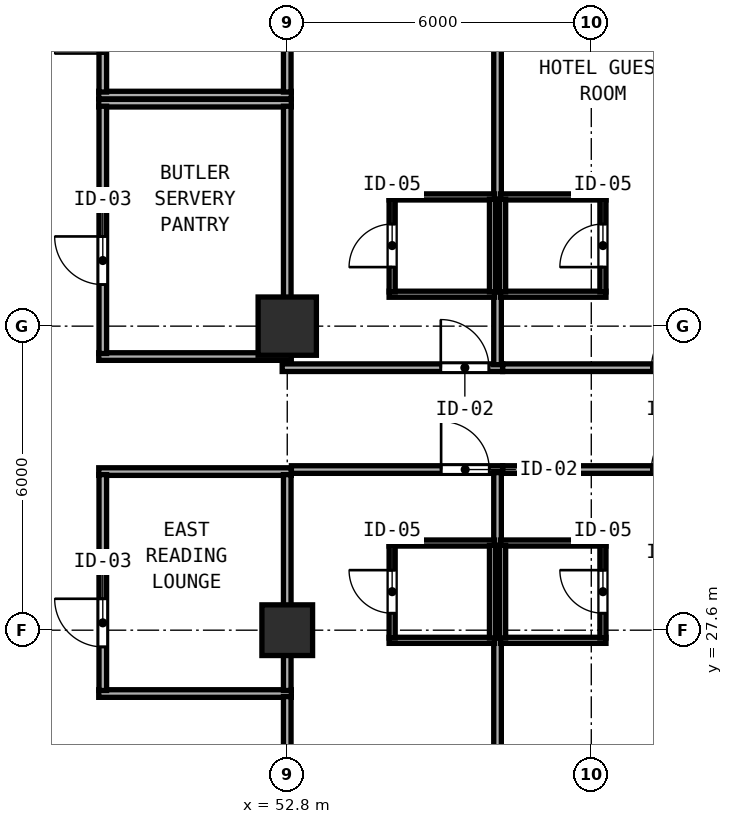
"""IFC4 building model, lengths in metres.
Left out: names, types, materials, properties, quantities, classifications, styles, units other than length and angle.
Written with IfcOpenShell. Run it as: python <this file> out.ifc"""

import sys

from ifc_helpers import new_model, si_unit, direction, frame, frame_2d, origin, origin_2d, place, context, subcontext, project, spatial, rectangle, hollow_rectangle, extrude, element, fill, save


model = new_model("IFC4")
c1 = context("Model", 3, precision=1e-05, world=origin(), true_north=direction((0.0, 1.0)))
c2 = subcontext(c1, "Body", "Model", "MODEL_VIEW")
j1 = project(units=[si_unit("LENGTHUNIT", "METRE"), si_unit("PLANEANGLEUNIT", "RADIAN")], contexts=[c1])
p1 = place(None, origin())
s1 = spatial("IfcSite", under=j1, at=p1, CompositionType="ELEMENT")
p2 = place(p1, origin())
s2 = spatial("IfcBuilding", under=s1, at=p2, CompositionType="ELEMENT")
p3 = place(p2, frame((0.0, 0.0, 78.0)))
s3 = spatial("IfcBuildingStorey", under=s2, at=p3, CompositionType="ELEMENT", Elevation=78.0)
p4 = place(p3, frame((52.8, 33.6, 0.0), z_axis=(0.0, 0.0, 1.0), x_axis=(1.0, 0.0, 0.0)))
e1 = element("IfcColumn", 1, at=p4, inside=s3, PredefinedType="COLUMN", context=c2, shape_type="SweptSolid", body=[
    extrude(hollow_rectangle(XDim=1.15, YDim=1.15, WallThickness=0.042, at=origin_2d()), origin(), (0.0, 0.0, 1.0), 3.8),
])
p5 = place(p3, frame((52.8, 27.6, 0.0), z_axis=(0.0, 0.0, 1.0), x_axis=(1.0, 0.0, 0.0)))
e2 = element("IfcColumn", 2, at=p5, inside=s3, PredefinedType="COLUMN", context=c2, shape_type="SweptSolid", body=[
    extrude(hollow_rectangle(XDim=1.0, YDim=1.0, WallThickness=0.038, at=origin_2d()), origin(), (0.0, 0.0, 1.0), 3.8),
])
for number, where, z_axis, x_axis in (
    (3, (49.08, 38.0, 0.0), (0.0, 0.0, 1.0), (1.0, 0.0, 0.0)),
    (4, (49.08, 33.0, 0.0), (0.0, 0.0, 1.0), (1.0, 0.0, 0.0)),
):
    element("IfcWall", number, at=place(p3, frame(where, z_axis=z_axis, x_axis=x_axis)), inside=s3, PredefinedType="PARTITIONING", context=c2, shape_type="SweptSolid", body=[
        extrude(rectangle(XDim=3.8, YDim=0.15, at=frame_2d((1.9, 0.0))), origin(), (0.0, 0.0, 1.0), 3.6),
    ])
p6 = place(p3, frame((49.16, 33.06, 0.0), z_axis=(0.0, 0.0, 1.0), x_axis=(0.0, 1.0, 0.0)))
e5 = element("IfcWall", 5, at=p6, inside=s3, PredefinedType="PARTITIONING", context=c2, shape_type="SweptSolid", body=[
    extrude(rectangle(XDim=4.88, YDim=0.15, at=frame_2d((2.44, 0.0))), origin(), (0.0, 0.0, 1.0), 3.6),
])
p7 = place(p6, frame((1.36, 0.0, 0.0)))
e6 = element("IfcOpeningElement", 6, at=p7, cuts=e5, PredefinedType="OPENING", context=c2, shape_type="SweptSolid", body=[
    extrude(rectangle(XDim=0.95, YDim=2.12, at=frame_2d((0.475, 1.06))), frame((0.0, 0.085, 0.0), z_axis=(0.0, -1.0, 0.0), x_axis=(1.0, 0.0, 0.0)), (0.0, 0.0, 1.0), 0.17),
])
p8 = place(p3, frame((52.8, 33.06, 0.0), z_axis=(0.0, 0.0, 1.0), x_axis=(0.0, 1.0, 0.0)))
e7 = element("IfcWall", 7, at=p8, inside=s3, PredefinedType="PARTITIONING", context=c2, shape_type="SweptSolid", body=[
    extrude(rectangle(XDim=4.88, YDim=0.15, at=frame_2d((2.44, 0.0))), origin(), (0.0, 0.0, 1.0), 3.097),
])
p9 = place(p3, frame((49.08, 38.16, 0.0), z_axis=(0.0, 0.0, 1.0), x_axis=(1.0, 0.0, 0.0)))
e8 = element("IfcWall", 8, at=p9, inside=s3, PredefinedType="PARTITIONING", context=c2, shape_type="SweptSolid", body=[
    extrude(rectangle(XDim=3.8, YDim=0.15, at=frame_2d((1.9, 0.0))), origin(), (0.0, 0.0, 1.0), 3.6),
])
p10 = place(p3, frame((49.16, 38.22, 0.0), z_axis=(0.0, 0.0, 1.0), x_axis=(0.0, 1.0, 0.0)))
e9 = element("IfcWall", 9, at=p10, inside=s3, PredefinedType="PARTITIONING", context=c2, shape_type="SweptSolid", body=[
    extrude(rectangle(XDim=3.12, YDim=0.15, at=frame_2d((1.56, 0.0))), origin(), (0.0, 0.0, 1.0), 3.6),
])
p11 = place(p10, frame((0.76, 0.0, 0.0)))
e10 = element("IfcOpeningElement", 10, at=p11, cuts=e9, PredefinedType="OPENING", context=c2, shape_type="SweptSolid", body=[
    extrude(rectangle(XDim=0.95, YDim=2.12, at=frame_2d((0.475, 1.06))), frame((0.0, 0.085, 0.0), z_axis=(0.0, -1.0, 0.0), x_axis=(1.0, 0.0, 0.0)), (0.0, 0.0, 1.0), 0.17),
])
p12 = place(p3, frame((52.8, 38.22, 0.0), z_axis=(0.0, 0.0, 1.0), x_axis=(0.0, 1.0, 0.0)))
e11 = element("IfcWall", 11, at=p12, inside=s3, PredefinedType="PARTITIONING", context=c2, shape_type="SweptSolid", body=[
    extrude(rectangle(XDim=3.12, YDim=0.15, at=frame_2d((1.56, 0.0))), origin(), (0.0, 0.0, 1.0), 3.097),
])
for number, where, z_axis, x_axis in (
    (12, (49.08, 30.73, 0.0), (0.0, 0.0, 1.0), (1.0, 0.0, 0.0)),
    (13, (49.08, 26.35, 0.0), (0.0, 0.0, 1.0), (1.0, 0.0, 0.0)),
):
    element("IfcWall", number, at=place(p3, frame(where, z_axis=z_axis, x_axis=x_axis)), inside=s3, PredefinedType="PARTITIONING", context=c2, shape_type="SweptSolid", body=[
        extrude(rectangle(XDim=3.8, YDim=0.15, at=frame_2d((1.9, 0.0))), origin(), (0.0, 0.0, 1.0), 3.6),
    ])
p13 = place(p3, frame((49.16, 26.41, 0.0), z_axis=(0.0, 0.0, 1.0), x_axis=(0.0, 1.0, 0.0)))
e14 = element("IfcWall", 14, at=p13, inside=s3, PredefinedType="PARTITIONING", context=c2, shape_type="SweptSolid", body=[
    extrude(rectangle(XDim=4.26, YDim=0.15, at=frame_2d((2.13, 0.0))), origin(), (0.0, 0.0, 1.0), 3.6),
])
p14 = place(p13, frame((0.86, 0.0, 0.0)))
e15 = element("IfcOpeningElement", 15, at=p14, cuts=e14, PredefinedType="OPENING", context=c2, shape_type="SweptSolid", body=[
    extrude(rectangle(XDim=0.95, YDim=2.12, at=frame_2d((0.475, 1.06))), frame((0.0, 0.085, 0.0), z_axis=(0.0, -1.0, 0.0), x_axis=(1.0, 0.0, 0.0)), (0.0, 0.0, 1.0), 0.17),
])
p15 = place(p3, frame((52.8, 26.41, 0.0), z_axis=(0.0, 0.0, 1.0), x_axis=(0.0, 1.0, 0.0)))
e16 = element("IfcWall", 16, at=p15, inside=s3, PredefinedType="PARTITIONING", context=c2, shape_type="SweptSolid", body=[
    extrude(rectangle(XDim=4.26, YDim=0.15, at=frame_2d((2.13, 0.0))), origin(), (0.0, 0.0, 1.0), 3.097),
])
p16 = place(p3, frame((52.7, 32.78, 0.0), z_axis=(0.0, 0.0, 1.0), x_axis=(1.0, 0.0, 0.0)))
e17 = element("IfcWall", 17, at=p16, inside=s3, PredefinedType="PARTITIONING", context=c2, shape_type="SweptSolid", body=[
    extrude(rectangle(XDim=4.35, YDim=0.15, at=frame_2d((2.175, 0.0))), origin(), (0.0, 0.0, 1.0), 3.6),
])
p17 = place(p16, frame((3.13, 0.0, 0.0)))
e18 = element("IfcOpeningElement", 18, at=p17, cuts=e17, PredefinedType="OPENING", context=c2, shape_type="SweptSolid", body=[
    extrude(rectangle(XDim=0.95, YDim=2.15, at=frame_2d((0.475, 1.075))), frame((0.0, 0.085, 0.0), z_axis=(0.0, -1.0, 0.0), x_axis=(1.0, 0.0, 0.0)), (0.0, 0.0, 1.0), 0.17),
])
p18 = place(p3, frame((56.95, 32.84, 0.0), z_axis=(0.0, 0.0, 1.0), x_axis=(0.0, 1.0, 0.0)))
e19 = element("IfcWall", 19, at=p18, inside=s3, PredefinedType="PARTITIONING", context=c2, shape_type="SweptSolid", body=[
    extrude(rectangle(XDim=9.939, YDim=0.15, at=frame_2d((4.97, 0.0))), origin(), (0.0, 0.0, 1.0), 3.6),
])
for number, where, z_axis, x_axis in (
    (20, (54.81, 36.15, 0.0), (0.0, 0.0, 1.0), (1.0, 0.0, 0.0)),
    (21, (54.81, 34.23, 0.0), (0.0, 0.0, 1.0), (1.0, 0.0, 0.0)),
):
    element("IfcWall", number, at=place(p3, frame(where, z_axis=z_axis, x_axis=x_axis)), inside=s3, PredefinedType="PARTITIONING", context=c2, shape_type="SweptSolid", body=[
        extrude(rectangle(XDim=2.08, YDim=0.12, at=frame_2d((1.04, 0.0))), origin(), (0.0, 0.0, 1.0), 3.6),
    ])
p19 = place(p3, frame((54.87, 34.275, 0.0), z_axis=(0.0, 0.0, 1.0), x_axis=(0.0, 1.0, 0.0)))
e22 = element("IfcWall", 22, at=p19, inside=s3, PredefinedType="PARTITIONING", context=c2, shape_type="SweptSolid", body=[
    extrude(rectangle(XDim=1.83, YDim=0.12, at=frame_2d((0.915, 0.0))), origin(), (0.0, 0.0, 1.0), 3.6),
])
p20 = place(p19, frame((1.34, 0.0, 0.0), z_axis=(0.0, 0.0, 1.0), x_axis=(-1.0, 0.0, 0.0)))
e23 = element("IfcOpeningElement", 23, at=p20, cuts=e22, PredefinedType="OPENING", context=c2, shape_type="SweptSolid", body=[
    extrude(rectangle(XDim=0.85, YDim=2.1, at=frame_2d((0.425, 1.05))), frame((0.0, 0.07, 0.0), z_axis=(0.0, -1.0, 0.0), x_axis=(1.0, 0.0, 0.0)), (0.0, 0.0, 1.0), 0.14),
])
p21 = place(p3, frame((56.85, 34.275, 0.0), z_axis=(0.0, 0.0, 1.0), x_axis=(0.0, 1.0, 0.0)))
e24 = element("IfcWall", 24, at=p21, inside=s3, PredefinedType="PARTITIONING", context=c2, shape_type="SweptSolid", body=[
    extrude(rectangle(XDim=1.83, YDim=0.12, at=frame_2d((0.915, 0.0))), origin(), (0.0, 0.0, 1.0), 3.6),
])
p22 = place(p3, frame((57.052, 32.78, 0.0), z_axis=(0.0, 0.0, 1.0), x_axis=(1.0, 0.0, 0.0)))
e25 = element("IfcWall", 25, at=p22, inside=s3, PredefinedType="PARTITIONING", context=c2, shape_type="SweptSolid", body=[
    extrude(rectangle(XDim=4.148, YDim=0.15, at=frame_2d((2.074, 0.0))), origin(), (0.0, 0.0, 1.0), 3.6),
])
p23 = place(p22, frame((2.935, 0.0, 0.0)))
e26 = element("IfcOpeningElement", 26, at=p23, cuts=e25, PredefinedType="OPENING", context=c2, shape_type="SweptSolid", body=[
    extrude(rectangle(XDim=0.95, YDim=2.15, at=frame_2d((0.475, 1.075))), frame((0.0, 0.085, 0.0), z_axis=(0.0, -1.0, 0.0), x_axis=(1.0, 0.0, 0.0)), (0.0, 0.0, 1.0), 0.17),
])
for number, where, z_axis, x_axis in (
    (27, (57.01, 36.15, 0.0), (0.0, 0.0, 1.0), (1.0, 0.0, 0.0)),
    (28, (57.01, 34.23, 0.0), (0.0, 0.0, 1.0), (1.0, 0.0, 0.0)),
):
    element("IfcWall", number, at=place(p3, frame(where, z_axis=z_axis, x_axis=x_axis)), inside=s3, PredefinedType="PARTITIONING", context=c2, shape_type="SweptSolid", body=[
        extrude(rectangle(XDim=2.08, YDim=0.12, at=frame_2d((1.04, 0.0))), origin(), (0.0, 0.0, 1.0), 3.6),
    ])
p24 = place(p3, frame((57.05, 34.275, 0.0), z_axis=(0.0, 0.0, 1.0), x_axis=(0.0, 1.0, 0.0)))
e29 = element("IfcWall", 29, at=p24, inside=s3, PredefinedType="PARTITIONING", context=c2, shape_type="SweptSolid", body=[
    extrude(rectangle(XDim=1.83, YDim=0.12, at=frame_2d((0.915, 0.0))), origin(), (0.0, 0.0, 1.0), 3.6),
])
p25 = place(p3, frame((59.03, 34.275, 0.0), z_axis=(0.0, 0.0, 1.0), x_axis=(0.0, 1.0, 0.0)))
e30 = element("IfcWall", 30, at=p25, inside=s3, PredefinedType="PARTITIONING", context=c2, shape_type="SweptSolid", body=[
    extrude(rectangle(XDim=1.83, YDim=0.12, at=frame_2d((0.915, 0.0))), origin(), (0.0, 0.0, 1.0), 3.6),
])
p26 = place(p25, frame((0.49, 0.0, 0.0)))
e31 = element("IfcOpeningElement", 31, at=p26, cuts=e30, PredefinedType="OPENING", context=c2, shape_type="SweptSolid", body=[
    extrude(rectangle(XDim=0.85, YDim=2.1, at=frame_2d((0.425, 1.05))), frame((0.0, 0.07, 0.0), z_axis=(0.0, -1.0, 0.0), x_axis=(1.0, 0.0, 0.0)), (0.0, 0.0, 1.0), 0.14),
])
p27 = place(p3, frame((52.882, 30.77, 0.0), z_axis=(0.0, 0.0, 1.0), x_axis=(1.0, 0.0, 0.0)))
e32 = element("IfcWall", 32, at=p27, inside=s3, PredefinedType="PARTITIONING", context=c2, shape_type="SweptSolid", body=[
    extrude(rectangle(XDim=4.168, YDim=0.15, at=frame_2d((2.084, 0.0))), origin(), (0.0, 0.0, 1.0), 3.6),
])
p28 = place(p27, frame((3.905, 0.0, 0.0), z_axis=(0.0, 0.0, 1.0), x_axis=(-1.0, 0.0, 0.0)))
e33 = element("IfcOpeningElement", 33, at=p28, cuts=e32, PredefinedType="OPENING", context=c2, shape_type="SweptSolid", body=[
    extrude(rectangle(XDim=0.95, YDim=2.15, at=frame_2d((0.475, 1.075))), frame((0.0, 0.085, 0.0), z_axis=(0.0, -1.0, 0.0), x_axis=(1.0, 0.0, 0.0)), (0.0, 0.0, 1.0), 0.17),
])
p29 = place(p3, frame((52.8, 21.819, 0.0), z_axis=(0.0, 0.0, 1.0), x_axis=(0.0, 1.0, 0.0)))
e34 = element("IfcWall", 34, at=p29, inside=s3, PredefinedType="PARTITIONING", context=c2, shape_type="SweptSolid", body=[
    extrude(rectangle(XDim=4.471, YDim=0.15, at=frame_2d((2.236, 0.0))), origin(), (0.0, 0.0, 1.0), 3.097),
])
p30 = place(p3, frame((56.95, 18.889, 0.0), z_axis=(0.0, 0.0, 1.0), x_axis=(0.0, 1.0, 0.0)))
e35 = element("IfcWall", 35, at=p30, inside=s3, PredefinedType="PARTITIONING", context=c2, shape_type="SweptSolid", body=[
    extrude(rectangle(XDim=11.821, YDim=0.15, at=frame_2d((5.91, 0.0))), origin(), (0.0, 0.0, 1.0), 3.6),
])
p31 = place(p3, frame((54.81, 29.32, 0.0), z_axis=(0.0, 0.0, 1.0), x_axis=(1.0, 0.0, 0.0)))
e36 = element("IfcWall", 36, at=p31, inside=s3, PredefinedType="PARTITIONING", context=c2, shape_type="SweptSolid", body=[
    extrude(rectangle(XDim=2.08, YDim=0.12, at=frame_2d((1.04, 0.0))), origin(), (0.0, 0.0, 1.0), 3.6),
])
p32 = place(p3, frame((54.81, 27.4, 0.0), z_axis=(0.0, 0.0, 1.0), x_axis=(1.0, 0.0, 0.0)))
e37 = element("IfcWall", 37, at=p32, inside=s3, PredefinedType="PARTITIONING", context=c2, shape_type="SweptSolid", body=[
    extrude(rectangle(XDim=2.08, YDim=0.12, at=frame_2d((1.04, 0.0))), origin(), (0.0, 0.0, 1.0), 3.097),
])
p33 = place(p3, frame((54.87, 27.445, 0.0), z_axis=(0.0, 0.0, 1.0), x_axis=(0.0, 1.0, 0.0)))
e38 = element("IfcWall", 38, at=p33, inside=s3, PredefinedType="PARTITIONING", context=c2, shape_type="SweptSolid", body=[
    extrude(rectangle(XDim=1.83, YDim=0.12, at=frame_2d((0.915, 0.0))), origin(), (0.0, 0.0, 1.0), 3.6),
])
p34 = place(p33, frame((1.34, 0.0, 0.0), z_axis=(0.0, 0.0, 1.0), x_axis=(-1.0, 0.0, 0.0)))
e39 = element("IfcOpeningElement", 39, at=p34, cuts=e38, PredefinedType="OPENING", context=c2, shape_type="SweptSolid", body=[
    extrude(rectangle(XDim=0.85, YDim=2.1, at=frame_2d((0.425, 1.05))), frame((0.0, 0.07, 0.0), z_axis=(0.0, -1.0, 0.0), x_axis=(1.0, 0.0, 0.0)), (0.0, 0.0, 1.0), 0.14),
])
p35 = place(p3, frame((56.85, 27.445, 0.0), z_axis=(0.0, 0.0, 1.0), x_axis=(0.0, 1.0, 0.0)))
e40 = element("IfcWall", 40, at=p35, inside=s3, PredefinedType="PARTITIONING", context=c2, shape_type="SweptSolid", body=[
    extrude(rectangle(XDim=1.83, YDim=0.12, at=frame_2d((0.915, 0.0))), origin(), (0.0, 0.0, 1.0), 3.6),
])
p36 = place(p3, frame((57.052, 30.77, 0.0), z_axis=(0.0, 0.0, 1.0), x_axis=(1.0, 0.0, 0.0)))
e41 = element("IfcWall", 41, at=p36, inside=s3, PredefinedType="PARTITIONING", context=c2, shape_type="SweptSolid", body=[
    extrude(rectangle(XDim=4.148, YDim=0.15, at=frame_2d((2.074, 0.0))), origin(), (0.0, 0.0, 1.0), 3.6),
])
p37 = place(p36, frame((3.885, 0.0, 0.0), z_axis=(0.0, 0.0, 1.0), x_axis=(-1.0, 0.0, 0.0)))
e42 = element("IfcOpeningElement", 42, at=p37, cuts=e41, PredefinedType="OPENING", context=c2, shape_type="SweptSolid", body=[
    extrude(rectangle(XDim=0.95, YDim=2.15, at=frame_2d((0.475, 1.075))), frame((0.0, 0.085, 0.0), z_axis=(0.0, -1.0, 0.0), x_axis=(1.0, 0.0, 0.0)), (0.0, 0.0, 1.0), 0.17),
])
p38 = place(p3, frame((57.01, 29.32, 0.0), z_axis=(0.0, 0.0, 1.0), x_axis=(1.0, 0.0, 0.0)))
e43 = element("IfcWall", 43, at=p38, inside=s3, PredefinedType="PARTITIONING", context=c2, shape_type="SweptSolid", body=[
    extrude(rectangle(XDim=2.08, YDim=0.12, at=frame_2d((1.04, 0.0))), origin(), (0.0, 0.0, 1.0), 3.6),
])
p39 = place(p3, frame((57.01, 27.4, 0.0), z_axis=(0.0, 0.0, 1.0), x_axis=(1.0, 0.0, 0.0)))
e44 = element("IfcWall", 44, at=p39, inside=s3, PredefinedType="PARTITIONING", context=c2, shape_type="SweptSolid", body=[
    extrude(rectangle(XDim=2.08, YDim=0.12, at=frame_2d((1.04, 0.0))), origin(), (0.0, 0.0, 1.0), 3.097),
])
p40 = place(p3, frame((57.05, 27.445, 0.0), z_axis=(0.0, 0.0, 1.0), x_axis=(0.0, 1.0, 0.0)))
e45 = element("IfcWall", 45, at=p40, inside=s3, PredefinedType="PARTITIONING", context=c2, shape_type="SweptSolid", body=[
    extrude(rectangle(XDim=1.83, YDim=0.12, at=frame_2d((0.915, 0.0))), origin(), (0.0, 0.0, 1.0), 3.6),
])
p41 = place(p3, frame((59.03, 27.445, 0.0), z_axis=(0.0, 0.0, 1.0), x_axis=(0.0, 1.0, 0.0)))
e46 = element("IfcWall", 46, at=p41, inside=s3, PredefinedType="PARTITIONING", context=c2, shape_type="SweptSolid", body=[
    extrude(rectangle(XDim=1.83, YDim=0.12, at=frame_2d((0.915, 0.0))), origin(), (0.0, 0.0, 1.0), 3.6),
])
p42 = place(p41, frame((0.49, 0.0, 0.0)))
e47 = element("IfcOpeningElement", 47, at=p42, cuts=e46, PredefinedType="OPENING", context=c2, shape_type="SweptSolid", body=[
    extrude(rectangle(XDim=0.85, YDim=2.1, at=frame_2d((0.425, 1.05))), frame((0.0, 0.07, 0.0), z_axis=(0.0, -1.0, 0.0), x_axis=(1.0, 0.0, 0.0)), (0.0, 0.0, 1.0), 0.14),
])
p43 = place(p7, origin())
e48 = element("IfcDoor", 48, at=p43, inside=s3, OperationType="SINGLE_SWING_RIGHT", PredefinedType="DOOR", context=c2, shape_type="SweptSolid", body=[
    extrude(rectangle(XDim=0.95, YDim=2.12, at=frame_2d((0.475, 1.06))), frame((0.0, 0.025, 0.0), z_axis=(0.0, -1.0, 0.0), x_axis=(1.0, 0.0, 0.0)), (0.0, 0.0, 1.0), 0.05),
])
fill(e6, e48)
p44 = place(p11, origin())
e49 = element("IfcDoor", 49, at=p44, inside=s3, OperationType="SINGLE_SWING_LEFT", PredefinedType="DOOR", context=c2, shape_type="SweptSolid", body=[
    extrude(rectangle(XDim=0.95, YDim=2.12, at=frame_2d((0.475, 1.06))), frame((0.0, 0.025, 0.0), z_axis=(0.0, -1.0, 0.0), x_axis=(1.0, 0.0, 0.0)), (0.0, 0.0, 1.0), 0.05),
])
fill(e10, e49)
p45 = place(p14, origin())
e50 = element("IfcDoor", 50, at=p45, inside=s3, OperationType="SINGLE_SWING_RIGHT", PredefinedType="DOOR", context=c2, shape_type="SweptSolid", body=[
    extrude(rectangle(XDim=0.95, YDim=2.12, at=frame_2d((0.475, 1.06))), frame((0.0, 0.025, 0.0), z_axis=(0.0, -1.0, 0.0), x_axis=(1.0, 0.0, 0.0)), (0.0, 0.0, 1.0), 0.05),
])
fill(e15, e50)
p46 = place(p17, origin())
e51 = element("IfcDoor", 51, at=p46, inside=s3, OperationType="SINGLE_SWING_LEFT", PredefinedType="DOOR", context=c2, shape_type="SweptSolid", body=[
    extrude(rectangle(XDim=0.95, YDim=2.15, at=frame_2d((0.475, 1.075))), frame((0.0, 0.025, 0.0), z_axis=(0.0, -1.0, 0.0), x_axis=(1.0, 0.0, 0.0)), (0.0, 0.0, 1.0), 0.05),
])
fill(e18, e51)
p47 = place(p20, origin())
e52 = element("IfcDoor", 52, at=p47, inside=s3, OperationType="SINGLE_SWING_RIGHT", PredefinedType="DOOR", context=c2, shape_type="SweptSolid", body=[
    extrude(rectangle(XDim=0.85, YDim=2.1, at=frame_2d((0.425, 1.05))), frame((0.0, 0.025, 0.0), z_axis=(0.0, -1.0, 0.0), x_axis=(1.0, 0.0, 0.0)), (0.0, 0.0, 1.0), 0.05),
])
fill(e23, e52)
p48 = place(p23, origin())
e53 = element("IfcDoor", 53, at=p48, inside=s3, OperationType="SINGLE_SWING_RIGHT", PredefinedType="DOOR", context=c2, shape_type="SweptSolid", body=[
    extrude(rectangle(XDim=0.95, YDim=2.15, at=frame_2d((0.475, 1.075))), frame((0.0, 0.025, 0.0), z_axis=(0.0, -1.0, 0.0), x_axis=(1.0, 0.0, 0.0)), (0.0, 0.0, 1.0), 0.05),
])
fill(e26, e53)
p49 = place(p26, origin())
e54 = element("IfcDoor", 54, at=p49, inside=s3, OperationType="SINGLE_SWING_LEFT", PredefinedType="DOOR", context=c2, shape_type="SweptSolid", body=[
    extrude(rectangle(XDim=0.85, YDim=2.1, at=frame_2d((0.425, 1.05))), frame((0.0, 0.025, 0.0), z_axis=(0.0, -1.0, 0.0), x_axis=(1.0, 0.0, 0.0)), (0.0, 0.0, 1.0), 0.05),
])
fill(e31, e54)
p50 = place(p28, origin())
e55 = element("IfcDoor", 55, at=p50, inside=s3, OperationType="SINGLE_SWING_RIGHT", PredefinedType="DOOR", context=c2, shape_type="SweptSolid", body=[
    extrude(rectangle(XDim=0.95, YDim=2.15, at=frame_2d((0.475, 1.075))), frame((0.0, 0.025, 0.0), z_axis=(0.0, -1.0, 0.0), x_axis=(1.0, 0.0, 0.0)), (0.0, 0.0, 1.0), 0.05),
])
fill(e33, e55)
p51 = place(p34, origin())
e56 = element("IfcDoor", 56, at=p51, inside=s3, OperationType="SINGLE_SWING_LEFT", PredefinedType="DOOR", context=c2, shape_type="SweptSolid", body=[
    extrude(rectangle(XDim=0.85, YDim=2.1, at=frame_2d((0.425, 1.05))), frame((0.0, 0.025, 0.0), z_axis=(0.0, -1.0, 0.0), x_axis=(1.0, 0.0, 0.0)), (0.0, 0.0, 1.0), 0.05),
])
fill(e39, e56)
p52 = place(p37, origin())
e57 = element("IfcDoor", 57, at=p52, inside=s3, OperationType="SINGLE_SWING_LEFT", PredefinedType="DOOR", context=c2, shape_type="SweptSolid", body=[
    extrude(rectangle(XDim=0.95, YDim=2.15, at=frame_2d((0.475, 1.075))), frame((0.0, 0.025, 0.0), z_axis=(0.0, -1.0, 0.0), x_axis=(1.0, 0.0, 0.0)), (0.0, 0.0, 1.0), 0.05),
])
fill(e42, e57)
p53 = place(p42, origin())
e58 = element("IfcDoor", 58, at=p53, inside=s3, OperationType="SINGLE_SWING_RIGHT", PredefinedType="DOOR", context=c2, shape_type="SweptSolid", body=[
    extrude(rectangle(XDim=0.85, YDim=2.1, at=frame_2d((0.425, 1.05))), frame((0.0, 0.025, 0.0), z_axis=(0.0, -1.0, 0.0), x_axis=(1.0, 0.0, 0.0)), (0.0, 0.0, 1.0), 0.05),
])
fill(e47, e58)
save(model, sys.argv[1])
